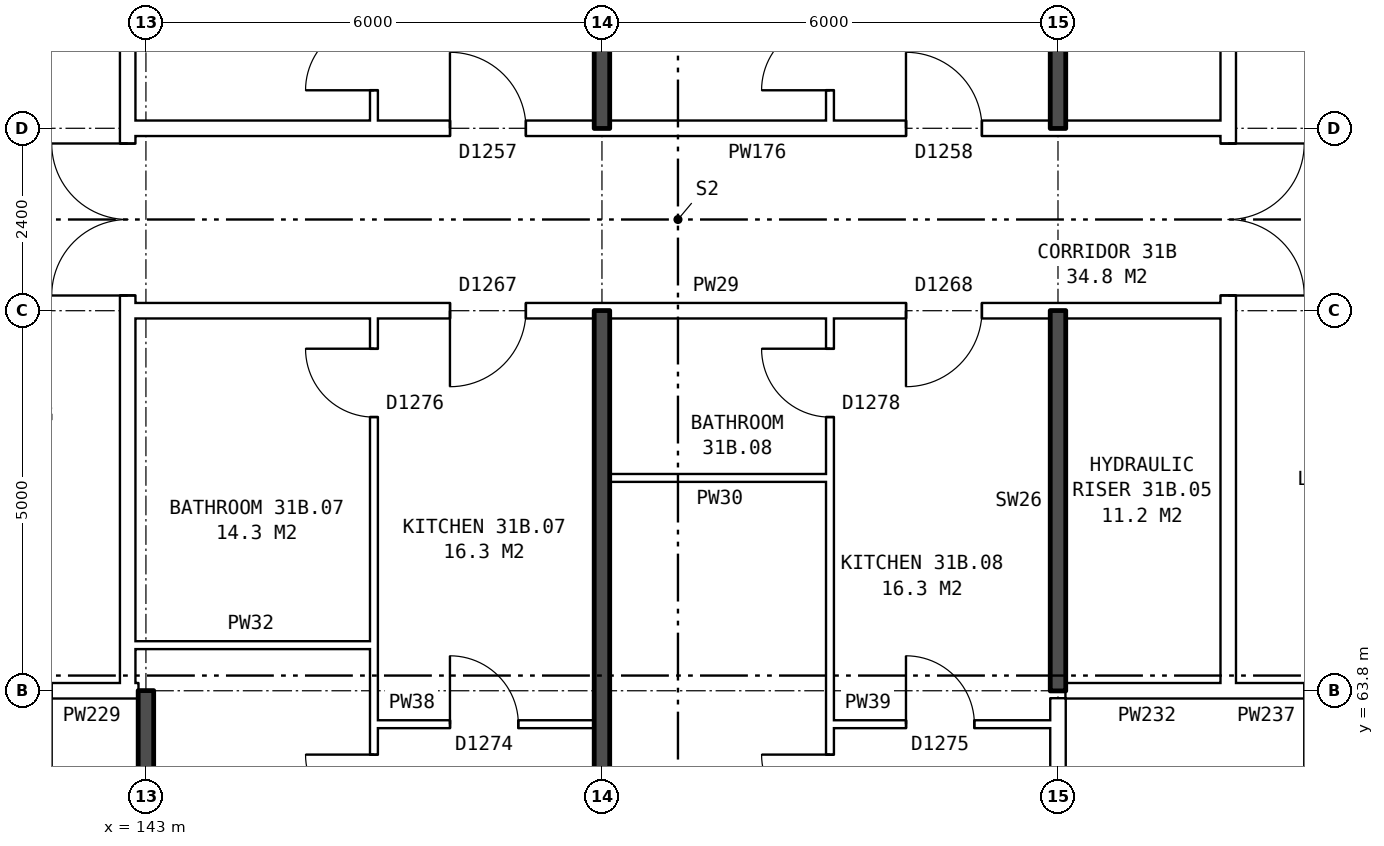
"""IFC4 building model, lengths in metres.
Left out: names, types, materials, properties, quantities, classifications, styles, units other than length and angle.
Written with IfcOpenShell. Run it as: python <this file> out.ifc"""

import sys

from ifc_helpers import new_model, si_unit, direction, frame, frame_2d, origin, place, context, subcontext, project, spatial, rectangle, extrude, element, fill, save


model = new_model("IFC4")
c1 = context("Model", 3, precision=1e-05, world=origin(), true_north=direction((0.0, 1.0)))
c2 = subcontext(c1, "Body", "Model", "MODEL_VIEW")
j1 = project(units=[si_unit("LENGTHUNIT", "METRE"), si_unit("PLANEANGLEUNIT", "RADIAN")], contexts=[c1])
p1 = place(None, origin())
s1 = spatial("IfcSite", under=j1, at=p1, CompositionType="ELEMENT")
p2 = place(p1, origin())
s2 = spatial("IfcBuilding", under=s1, at=p2, CompositionType="ELEMENT")
p3 = place(p2, frame((0.0, 0.0, 111.9)))
s3 = spatial("IfcBuildingStorey", under=s2, at=p3, CompositionType="ELEMENT", Elevation=111.9)
p4 = place(p3, frame((142.76, 63.9, 0.0), z_axis=(0.0, 0.0, 1.0), x_axis=(0.0, 1.0, 0.0)))
e1 = element("IfcWall", 1, at=p4, inside=s3, PredefinedType="PARTITIONING", context=c2, shape_type="SweptSolid", body=[
    extrude(rectangle(XDim=12.2, YDim=0.2, at=frame_2d((6.1, 0.0))), origin(), (0.0, 0.0, 1.0), 2.85),
])
p5 = place(p4, frame((5.1, 0.0, 0.0)))
e2 = element("IfcOpeningElement", 2, at=p5, cuts=e1, PredefinedType="OPENING", context=c2, shape_type="SweptSolid", body=[
    extrude(rectangle(XDim=2.0, YDim=2.1, at=frame_2d((1.0, 1.05))), frame((0.0, 0.11, 0.0), z_axis=(0.0, -1.0, 0.0), x_axis=(1.0, 0.0, 0.0)), (0.0, 0.0, 1.0), 0.22),
])
p6 = place(p3, frame((157.24, 63.9, 0.0), z_axis=(0.0, 0.0, 1.0), x_axis=(0.0, 1.0, 0.0)))
e3 = element("IfcWall", 3, at=p6, inside=s3, PredefinedType="PARTITIONING", context=c2, shape_type="SweptSolid", body=[
    extrude(rectangle(XDim=12.2, YDim=0.2, at=frame_2d((6.1, 0.0))), origin(), (0.0, 0.0, 1.0), 2.85),
])
p7 = place(p6, frame((5.1, 0.0, 0.0)))
e4 = element("IfcOpeningElement", 4, at=p7, cuts=e3, PredefinedType="OPENING", context=c2, shape_type="SweptSolid", body=[
    extrude(rectangle(XDim=2.0, YDim=2.1, at=frame_2d((1.0, 1.05))), frame((0.0, 0.11, 0.0), z_axis=(0.0, -1.0, 0.0), x_axis=(1.0, 0.0, 0.0)), (0.0, 0.0, 1.0), 0.22),
])
p8 = place(p3, frame((146.0, 63.36, 0.0), z_axis=(0.0, 0.0, 1.0), x_axis=(1.0, 0.0, 0.0)))
e5 = element("IfcWall", 5, at=p8, inside=s3, PredefinedType="PARTITIONING", context=c2, shape_type="SweptSolid", body=[
    extrude(rectangle(XDim=2.9, YDim=0.1, at=frame_2d((1.45, 0.0))), origin(), (0.0, 0.0, 1.0), 2.85),
])
p9 = place(p8, frame((1.0, 0.0, 0.0)))
e6 = element("IfcOpeningElement", 6, at=p9, cuts=e5, PredefinedType="OPENING", context=c2, shape_type="SweptSolid", body=[
    extrude(rectangle(XDim=0.9, YDim=2.1, at=frame_2d((0.45, 1.05))), frame((0.0, 0.06, 0.0), z_axis=(0.0, -1.0, 0.0), x_axis=(1.0, 0.0, 0.0)), (0.0, 0.0, 1.0), 0.12),
])
p10 = place(p3, frame((152.0, 63.36, 0.0), z_axis=(0.0, 0.0, 1.0), x_axis=(1.0, 0.0, 0.0)))
e7 = element("IfcWall", 7, at=p10, inside=s3, PredefinedType="PARTITIONING", context=c2, shape_type="SweptSolid", body=[
    extrude(rectangle(XDim=2.9, YDim=0.1, at=frame_2d((1.45, 0.0))), origin(), (0.0, 0.0, 1.0), 2.85),
])
p11 = place(p10, frame((1.0, 0.0, 0.0)))
e8 = element("IfcOpeningElement", 8, at=p11, cuts=e7, PredefinedType="OPENING", context=c2, shape_type="SweptSolid", body=[
    extrude(rectangle(XDim=0.9, YDim=2.1, at=frame_2d((0.45, 1.05))), frame((0.0, 0.06, 0.0), z_axis=(0.0, -1.0, 0.0), x_axis=(1.0, 0.0, 0.0)), (0.0, 0.0, 1.0), 0.12),
])
p12 = place(p3, frame((139.76, 63.8, 0.0), z_axis=(0.0, 0.0, 1.0), x_axis=(1.0, 0.0, 0.0)))
e9 = element("IfcWall", 9, at=p12, inside=s3, PredefinedType="PARTITIONING", context=c2, shape_type="SweptSolid", body=[
    extrude(rectangle(XDim=3.0, YDim=0.2, at=frame_2d((1.5, 0.0))), origin(), (0.0, 0.0, 1.0), 2.85),
])
p13 = place(p12, frame((1.0, 0.0, 0.0)))
e10 = element("IfcOpeningElement", 10, at=p13, cuts=e9, PredefinedType="OPENING", context=c2, shape_type="SweptSolid", body=[
    extrude(rectangle(XDim=1.0, YDim=2.1, at=frame_2d((0.5, 1.05))), frame((0.0, 0.11, 0.0), z_axis=(0.0, -1.0, 0.0), x_axis=(1.0, 0.0, 0.0)), (0.0, 0.0, 1.0), 0.22),
])
p14 = place(p3, frame((142.76, 63.8, 0.0), z_axis=(0.0, 0.0, 1.0), x_axis=(1.0, 0.0, 0.0)))
e11 = element("IfcWall", 11, at=p14, inside=s3, PredefinedType="PARTITIONING", context=c2, shape_type="SweptSolid", body=[
    extrude(rectangle(XDim=0.14, YDim=0.2, at=frame_2d((0.07, 0.0))), origin(), (0.0, 0.0, 1.0), 2.85),
])
p15 = place(p3, frame((155.1, 63.8, 0.0), z_axis=(0.0, 0.0, 1.0), x_axis=(1.0, 0.0, 0.0)))
e12 = element("IfcWall", 12, at=p15, inside=s3, PredefinedType="PARTITIONING", context=c2, shape_type="SweptSolid", body=[
    extrude(rectangle(XDim=2.14, YDim=0.2, at=frame_2d((1.07, 0.0))), origin(), (0.0, 0.0, 1.0), 2.85),
])
p16 = place(p3, frame((157.24, 63.8, 0.0), z_axis=(0.0, 0.0, 1.0), x_axis=(1.0, 0.0, 0.0)))
e13 = element("IfcWall", 13, at=p16, inside=s3, PredefinedType="PARTITIONING", context=c2, shape_type="SweptSolid", body=[
    extrude(rectangle(XDim=3.0, YDim=0.2, at=frame_2d((1.5, 0.0))), origin(), (0.0, 0.0, 1.0), 2.85),
])
p17 = place(p16, frame((1.0, 0.0, 0.0)))
e14 = element("IfcOpeningElement", 14, at=p17, cuts=e13, PredefinedType="OPENING", context=c2, shape_type="SweptSolid", body=[
    extrude(rectangle(XDim=1.0, YDim=2.1, at=frame_2d((0.5, 1.05))), frame((0.0, 0.11, 0.0), z_axis=(0.0, -1.0, 0.0), x_axis=(1.0, 0.0, 0.0)), (0.0, 0.0, 1.0), 0.22),
])
p18 = place(p3, frame((142.76, 64.4, 0.0), z_axis=(0.0, 0.0, 1.0), x_axis=(1.0, 0.0, 0.0)))
e15 = element("IfcWall", 15, at=p18, inside=s3, PredefinedType="PARTITIONING", context=c2, shape_type="SweptSolid", body=[
    extrude(rectangle(XDim=3.24, YDim=0.1, at=frame_2d((1.62, 0.0))), origin(), (0.0, 0.0, 1.0), 2.85),
])
p19 = place(p3, frame((149.1, 66.6, 0.0), z_axis=(0.0, 0.0, 1.0), x_axis=(1.0, 0.0, 0.0)))
e16 = element("IfcWall", 16, at=p19, inside=s3, PredefinedType="PARTITIONING", context=c2, shape_type="SweptSolid", body=[
    extrude(rectangle(XDim=2.9, YDim=0.1, at=frame_2d((1.45, 0.0))), origin(), (0.0, 0.0, 1.0), 2.85),
])
p20 = place(p3, frame((142.76, 68.8, 0.0), z_axis=(0.0, 0.0, 1.0), x_axis=(1.0, 0.0, 0.0)))
e17 = element("IfcWall", 17, at=p20, inside=s3, PredefinedType="PARTITIONING", context=c2, shape_type="SweptSolid", body=[
    extrude(rectangle(XDim=14.48, YDim=0.2, at=frame_2d((7.24, 0.0))), origin(), (0.0, 0.0, 1.0), 2.85),
])
p21 = place(p20, frame((4.24, 0.0, 0.0)))
e18 = element("IfcOpeningElement", 18, at=p21, cuts=e17, PredefinedType="OPENING", context=c2, shape_type="SweptSolid", body=[
    extrude(rectangle(XDim=1.0, YDim=2.1, at=frame_2d((0.5, 1.05))), frame((0.0, 0.11, 0.0), z_axis=(0.0, -1.0, 0.0), x_axis=(1.0, 0.0, 0.0)), (0.0, 0.0, 1.0), 0.22),
])
p22 = place(p20, frame((10.24, 0.0, 0.0)))
e19 = element("IfcOpeningElement", 19, at=p22, cuts=e17, PredefinedType="OPENING", context=c2, shape_type="SweptSolid", body=[
    extrude(rectangle(XDim=1.0, YDim=2.1, at=frame_2d((0.5, 1.05))), frame((0.0, 0.11, 0.0), z_axis=(0.0, -1.0, 0.0), x_axis=(1.0, 0.0, 0.0)), (0.0, 0.0, 1.0), 0.22),
])
p23 = place(p3, frame((142.76, 71.2, 0.0), z_axis=(0.0, 0.0, 1.0), x_axis=(1.0, 0.0, 0.0)))
e20 = element("IfcWall", 20, at=p23, inside=s3, PredefinedType="PARTITIONING", context=c2, shape_type="SweptSolid", body=[
    extrude(rectangle(XDim=14.48, YDim=0.2, at=frame_2d((7.24, 0.0))), origin(), (0.0, 0.0, 1.0), 2.85),
])
p24 = place(p23, frame((4.24, 0.0, 0.0)))
e21 = element("IfcOpeningElement", 21, at=p24, cuts=e20, PredefinedType="OPENING", context=c2, shape_type="SweptSolid", body=[
    extrude(rectangle(XDim=1.0, YDim=2.1, at=frame_2d((0.5, 1.05))), frame((0.0, 0.11, 0.0), z_axis=(0.0, -1.0, 0.0), x_axis=(1.0, 0.0, 0.0)), (0.0, 0.0, 1.0), 0.22),
])
p25 = place(p23, frame((10.24, 0.0, 0.0)))
e22 = element("IfcOpeningElement", 22, at=p25, cuts=e20, PredefinedType="OPENING", context=c2, shape_type="SweptSolid", body=[
    extrude(rectangle(XDim=1.0, YDim=2.1, at=frame_2d((0.5, 1.05))), frame((0.0, 0.11, 0.0), z_axis=(0.0, -1.0, 0.0), x_axis=(1.0, 0.0, 0.0)), (0.0, 0.0, 1.0), 0.22),
])
p26 = place(p3, frame((143.0, 54.36, 0.0), z_axis=(0.0, 0.0, 1.0), x_axis=(0.0, 1.0, 0.0)))
e23 = element("IfcWall", 23, at=p26, inside=s3, PredefinedType="SOLIDWALL", context=c2, shape_type="SweptSolid", body=[
    extrude(rectangle(XDim=9.44, YDim=0.2, at=frame_2d((4.72, 0.0))), origin(), (0.0, 0.0, 1.0), 2.85),
])
p27 = place(p3, frame((146.0, 54.36, 0.0), z_axis=(0.0, 0.0, 1.0), x_axis=(0.0, 1.0, 0.0)))
e24 = element("IfcWall", 24, at=p27, inside=s3, PredefinedType="PARTITIONING", context=c2, shape_type="SweptSolid", body=[
    extrude(rectangle(XDim=14.34, YDim=0.1, at=frame_2d((7.17, 0.0))), origin(), (0.0, 0.0, 1.0), 2.85),
])
p28 = place(p27, frame((7.7, 0.0, 0.0)))
e25 = element("IfcOpeningElement", 25, at=p28, cuts=e24, PredefinedType="OPENING", context=c2, shape_type="SweptSolid", body=[
    extrude(rectangle(XDim=0.9, YDim=2.1, at=frame_2d((0.45, 1.05))), frame((0.0, 0.06, 0.0), z_axis=(0.0, -1.0, 0.0), x_axis=(1.0, 0.0, 0.0)), (0.0, 0.0, 1.0), 0.12),
])
p29 = place(p27, frame((13.04, 0.0, 0.0)))
e26 = element("IfcOpeningElement", 26, at=p29, cuts=e24, PredefinedType="OPENING", context=c2, shape_type="SweptSolid", body=[
    extrude(rectangle(XDim=0.9, YDim=2.1, at=frame_2d((0.45, 1.05))), frame((0.0, 0.06, 0.0), z_axis=(0.0, -1.0, 0.0), x_axis=(1.0, 0.0, 0.0)), (0.0, 0.0, 1.0), 0.12),
])
p30 = place(p3, frame((146.0, 71.3, 0.0), z_axis=(0.0, 0.0, 1.0), x_axis=(0.0, 1.0, 0.0)))
e27 = element("IfcWall", 27, at=p30, inside=s3, PredefinedType="PARTITIONING", context=c2, shape_type="SweptSolid", body=[
    extrude(rectangle(XDim=14.34, YDim=0.1, at=frame_2d((7.17, 0.0))), origin(), (0.0, 0.0, 1.0), 2.85),
])
p31 = place(p30, frame((7.94, 0.0, 0.0)))
e28 = element("IfcOpeningElement", 28, at=p31, cuts=e27, PredefinedType="OPENING", context=c2, shape_type="SweptSolid", body=[
    extrude(rectangle(XDim=0.9, YDim=2.1, at=frame_2d((0.45, 1.05))), frame((0.0, 0.06, 0.0), z_axis=(0.0, -1.0, 0.0), x_axis=(1.0, 0.0, 0.0)), (0.0, 0.0, 1.0), 0.12),
])
p32 = place(p30, frame((0.4, 0.0, 0.0)))
e29 = element("IfcOpeningElement", 29, at=p32, cuts=e27, PredefinedType="OPENING", context=c2, shape_type="SweptSolid", body=[
    extrude(rectangle(XDim=0.9, YDim=2.1, at=frame_2d((0.45, 1.05))), frame((0.0, 0.06, 0.0), z_axis=(0.0, -1.0, 0.0), x_axis=(1.0, 0.0, 0.0)), (0.0, 0.0, 1.0), 0.12),
])
for number, where, z_axis, x_axis in (
    (30, (149.0, 54.36, 0.0), (0.0, 0.0, 1.0), (0.0, 1.0, 0.0)),
    (31, (149.0, 71.2, 0.0), (0.0, 0.0, 1.0), (0.0, 1.0, 0.0)),
):
    element("IfcWall", number, at=place(p3, frame(where, z_axis=z_axis, x_axis=x_axis)), inside=s3, PredefinedType="SOLIDWALL", context=c2, shape_type="SweptSolid", body=[
        extrude(rectangle(XDim=14.44, YDim=0.2, at=frame_2d((7.22, 0.0))), origin(), (0.0, 0.0, 1.0), 2.85),
    ])
p33 = place(p3, frame((152.0, 54.36, 0.0), z_axis=(0.0, 0.0, 1.0), x_axis=(0.0, 1.0, 0.0)))
e32 = element("IfcWall", 32, at=p33, inside=s3, PredefinedType="PARTITIONING", context=c2, shape_type="SweptSolid", body=[
    extrude(rectangle(XDim=14.34, YDim=0.1, at=frame_2d((7.17, 0.0))), origin(), (0.0, 0.0, 1.0), 2.85),
])
p34 = place(p33, frame((7.7, 0.0, 0.0)))
e33 = element("IfcOpeningElement", 33, at=p34, cuts=e32, PredefinedType="OPENING", context=c2, shape_type="SweptSolid", body=[
    extrude(rectangle(XDim=0.9, YDim=2.1, at=frame_2d((0.45, 1.05))), frame((0.0, 0.06, 0.0), z_axis=(0.0, -1.0, 0.0), x_axis=(1.0, 0.0, 0.0)), (0.0, 0.0, 1.0), 0.12),
])
p35 = place(p33, frame((13.04, 0.0, 0.0)))
e34 = element("IfcOpeningElement", 34, at=p35, cuts=e32, PredefinedType="OPENING", context=c2, shape_type="SweptSolid", body=[
    extrude(rectangle(XDim=0.9, YDim=2.1, at=frame_2d((0.45, 1.05))), frame((0.0, 0.06, 0.0), z_axis=(0.0, -1.0, 0.0), x_axis=(1.0, 0.0, 0.0)), (0.0, 0.0, 1.0), 0.12),
])
p36 = place(p3, frame((152.0, 71.3, 0.0), z_axis=(0.0, 0.0, 1.0), x_axis=(0.0, 1.0, 0.0)))
e35 = element("IfcWall", 35, at=p36, inside=s3, PredefinedType="PARTITIONING", context=c2, shape_type="SweptSolid", body=[
    extrude(rectangle(XDim=14.34, YDim=0.1, at=frame_2d((7.17, 0.0))), origin(), (0.0, 0.0, 1.0), 2.85),
])
p37 = place(p36, frame((9.24, 0.0, 0.0)))
e36 = element("IfcOpeningElement", 36, at=p37, cuts=e35, PredefinedType="OPENING", context=c2, shape_type="SweptSolid", body=[
    extrude(rectangle(XDim=0.9, YDim=2.1, at=frame_2d((0.45, 1.05))), frame((0.0, 0.06, 0.0), z_axis=(0.0, -1.0, 0.0), x_axis=(1.0, 0.0, 0.0)), (0.0, 0.0, 1.0), 0.12),
])
p38 = place(p36, frame((0.4, 0.0, 0.0)))
e37 = element("IfcOpeningElement", 37, at=p38, cuts=e35, PredefinedType="OPENING", context=c2, shape_type="SweptSolid", body=[
    extrude(rectangle(XDim=0.9, YDim=2.1, at=frame_2d((0.45, 1.05))), frame((0.0, 0.06, 0.0), z_axis=(0.0, -1.0, 0.0), x_axis=(1.0, 0.0, 0.0)), (0.0, 0.0, 1.0), 0.12),
])
p39 = place(p3, frame((155.0, 61.5, 0.0), z_axis=(0.0, 0.0, 1.0), x_axis=(0.0, 1.0, 0.0)))
e38 = element("IfcWall", 38, at=p39, inside=s3, PredefinedType="PARTITIONING", context=c2, shape_type="SweptSolid", body=[
    extrude(rectangle(XDim=2.2, YDim=0.2, at=frame_2d((1.1, 0.0))), origin(), (0.0, 0.0, 1.0), 2.85),
])
for number, where, z_axis, x_axis in (
    (39, (155.0, 63.8, 0.0), (0.0, 0.0, 1.0), (0.0, 1.0, 0.0)),
    (40, (155.0, 71.2, 0.0), (0.0, 0.0, 1.0), (0.0, 1.0, 0.0)),
):
    element("IfcWall", number, at=place(p3, frame(where, z_axis=z_axis, x_axis=x_axis)), inside=s3, PredefinedType="SOLIDWALL", context=c2, shape_type="SweptSolid", body=[
        extrude(rectangle(XDim=5.0, YDim=0.2, at=frame_2d((2.5, 0.0))), origin(), (0.0, 0.0, 1.0), 2.85),
    ])
p40 = place(p5, origin())
e41 = element("IfcDoor", 41, at=p40, inside=s3, OperationType="DOUBLE_DOOR_SINGLE_SWING", PredefinedType="DOOR", context=c2, shape_type="SweptSolid", body=[
    extrude(rectangle(XDim=2.0, YDim=2.1, at=frame_2d((1.0, 1.05))), frame((0.0, 0.025, 0.0), z_axis=(0.0, -1.0, 0.0), x_axis=(1.0, 0.0, 0.0)), (0.0, 0.0, 1.0), 0.05),
])
fill(e2, e41)
p41 = place(p7, frame((2.0, 0.0, 0.0), z_axis=(0.0, 0.0, 1.0), x_axis=(-1.0, 0.0, 0.0)))
e42 = element("IfcDoor", 42, at=p41, inside=s3, OperationType="DOUBLE_DOOR_SINGLE_SWING", PredefinedType="DOOR", context=c2, shape_type="SweptSolid", body=[
    extrude(rectangle(XDim=2.0, YDim=2.1, at=frame_2d((1.0, 1.05))), frame((0.0, 0.025, 0.0), z_axis=(0.0, -1.0, 0.0), x_axis=(1.0, 0.0, 0.0)), (0.0, 0.0, 1.0), 0.05),
])
fill(e4, e42)
p42 = place(p28, origin())
e43 = element("IfcDoor", 43, at=p42, inside=s3, OperationType="SINGLE_SWING_RIGHT", PredefinedType="DOOR", context=c2, shape_type="SweptSolid", body=[
    extrude(rectangle(XDim=0.9, YDim=2.1, at=frame_2d((0.45, 1.05))), frame((0.0, 0.025, 0.0), z_axis=(0.0, -1.0, 0.0), x_axis=(1.0, 0.0, 0.0)), (0.0, 0.0, 1.0), 0.05),
])
fill(e25, e43)
p43 = place(p21, frame((1.0, 0.0, 0.0), z_axis=(0.0, 0.0, 1.0), x_axis=(-1.0, 0.0, 0.0)))
e44 = element("IfcDoor", 44, at=p43, inside=s3, OperationType="SINGLE_SWING_RIGHT", PredefinedType="DOOR", context=c2, shape_type="SweptSolid", body=[
    extrude(rectangle(XDim=1.0, YDim=2.1, at=frame_2d((0.5, 1.05))), frame((0.0, 0.025, 0.0), z_axis=(0.0, -1.0, 0.0), x_axis=(1.0, 0.0, 0.0)), (0.0, 0.0, 1.0), 0.05),
])
fill(e18, e44)
p44 = place(p9, origin())
e45 = element("IfcDoor", 45, at=p44, inside=s3, OperationType="SINGLE_SWING_LEFT", PredefinedType="DOOR", context=c2, shape_type="SweptSolid", body=[
    extrude(rectangle(XDim=0.9, YDim=2.1, at=frame_2d((0.45, 1.05))), frame((0.0, 0.025, 0.0), z_axis=(0.0, -1.0, 0.0), x_axis=(1.0, 0.0, 0.0)), (0.0, 0.0, 1.0), 0.05),
])
fill(e6, e45)
p45 = place(p29, origin())
e46 = element("IfcDoor", 46, at=p45, inside=s3, OperationType="SINGLE_SWING_RIGHT", PredefinedType="DOOR", context=c2, shape_type="SweptSolid", body=[
    extrude(rectangle(XDim=0.9, YDim=2.1, at=frame_2d((0.45, 1.05))), frame((0.0, 0.025, 0.0), z_axis=(0.0, -1.0, 0.0), x_axis=(1.0, 0.0, 0.0)), (0.0, 0.0, 1.0), 0.05),
])
fill(e26, e46)
p46 = place(p34, origin())
e47 = element("IfcDoor", 47, at=p46, inside=s3, OperationType="SINGLE_SWING_RIGHT", PredefinedType="DOOR", context=c2, shape_type="SweptSolid", body=[
    extrude(rectangle(XDim=0.9, YDim=2.1, at=frame_2d((0.45, 1.05))), frame((0.0, 0.025, 0.0), z_axis=(0.0, -1.0, 0.0), x_axis=(1.0, 0.0, 0.0)), (0.0, 0.0, 1.0), 0.05),
])
fill(e33, e47)
p47 = place(p22, frame((1.0, 0.0, 0.0), z_axis=(0.0, 0.0, 1.0), x_axis=(-1.0, 0.0, 0.0)))
e48 = element("IfcDoor", 48, at=p47, inside=s3, OperationType="SINGLE_SWING_RIGHT", PredefinedType="DOOR", context=c2, shape_type="SweptSolid", body=[
    extrude(rectangle(XDim=1.0, YDim=2.1, at=frame_2d((0.5, 1.05))), frame((0.0, 0.025, 0.0), z_axis=(0.0, -1.0, 0.0), x_axis=(1.0, 0.0, 0.0)), (0.0, 0.0, 1.0), 0.05),
])
fill(e19, e48)
p48 = place(p11, origin())
e49 = element("IfcDoor", 49, at=p48, inside=s3, OperationType="SINGLE_SWING_LEFT", PredefinedType="DOOR", context=c2, shape_type="SweptSolid", body=[
    extrude(rectangle(XDim=0.9, YDim=2.1, at=frame_2d((0.45, 1.05))), frame((0.0, 0.025, 0.0), z_axis=(0.0, -1.0, 0.0), x_axis=(1.0, 0.0, 0.0)), (0.0, 0.0, 1.0), 0.05),
])
fill(e8, e49)
p49 = place(p35, origin())
e50 = element("IfcDoor", 50, at=p49, inside=s3, OperationType="SINGLE_SWING_RIGHT", PredefinedType="DOOR", context=c2, shape_type="SweptSolid", body=[
    extrude(rectangle(XDim=0.9, YDim=2.1, at=frame_2d((0.45, 1.05))), frame((0.0, 0.025, 0.0), z_axis=(0.0, -1.0, 0.0), x_axis=(1.0, 0.0, 0.0)), (0.0, 0.0, 1.0), 0.05),
])
fill(e34, e50)
p50 = place(p24, origin())
e51 = element("IfcDoor", 51, at=p50, inside=s3, OperationType="SINGLE_SWING_LEFT", PredefinedType="DOOR", context=c2, shape_type="SweptSolid", body=[
    extrude(rectangle(XDim=1.0, YDim=2.1, at=frame_2d((0.5, 1.05))), frame((0.0, 0.025, 0.0), z_axis=(0.0, -1.0, 0.0), x_axis=(1.0, 0.0, 0.0)), (0.0, 0.0, 1.0), 0.05),
])
fill(e21, e51)
p51 = place(p32, origin())
e52 = element("IfcDoor", 52, at=p51, inside=s3, OperationType="SINGLE_SWING_LEFT", PredefinedType="DOOR", context=c2, shape_type="SweptSolid", body=[
    extrude(rectangle(XDim=0.9, YDim=2.1, at=frame_2d((0.45, 1.05))), frame((0.0, 0.025, 0.0), z_axis=(0.0, -1.0, 0.0), x_axis=(1.0, 0.0, 0.0)), (0.0, 0.0, 1.0), 0.05),
])
fill(e29, e52)
p52 = place(p25, origin())
e53 = element("IfcDoor", 53, at=p52, inside=s3, OperationType="SINGLE_SWING_LEFT", PredefinedType="DOOR", context=c2, shape_type="SweptSolid", body=[
    extrude(rectangle(XDim=1.0, YDim=2.1, at=frame_2d((0.5, 1.05))), frame((0.0, 0.025, 0.0), z_axis=(0.0, -1.0, 0.0), x_axis=(1.0, 0.0, 0.0)), (0.0, 0.0, 1.0), 0.05),
])
fill(e22, e53)
p53 = place(p38, origin())
e54 = element("IfcDoor", 54, at=p53, inside=s3, OperationType="SINGLE_SWING_LEFT", PredefinedType="DOOR", context=c2, shape_type="SweptSolid", body=[
    extrude(rectangle(XDim=0.9, YDim=2.1, at=frame_2d((0.45, 1.05))), frame((0.0, 0.025, 0.0), z_axis=(0.0, -1.0, 0.0), x_axis=(1.0, 0.0, 0.0)), (0.0, 0.0, 1.0), 0.05),
])
fill(e37, e54)
save(model, sys.argv[1])
